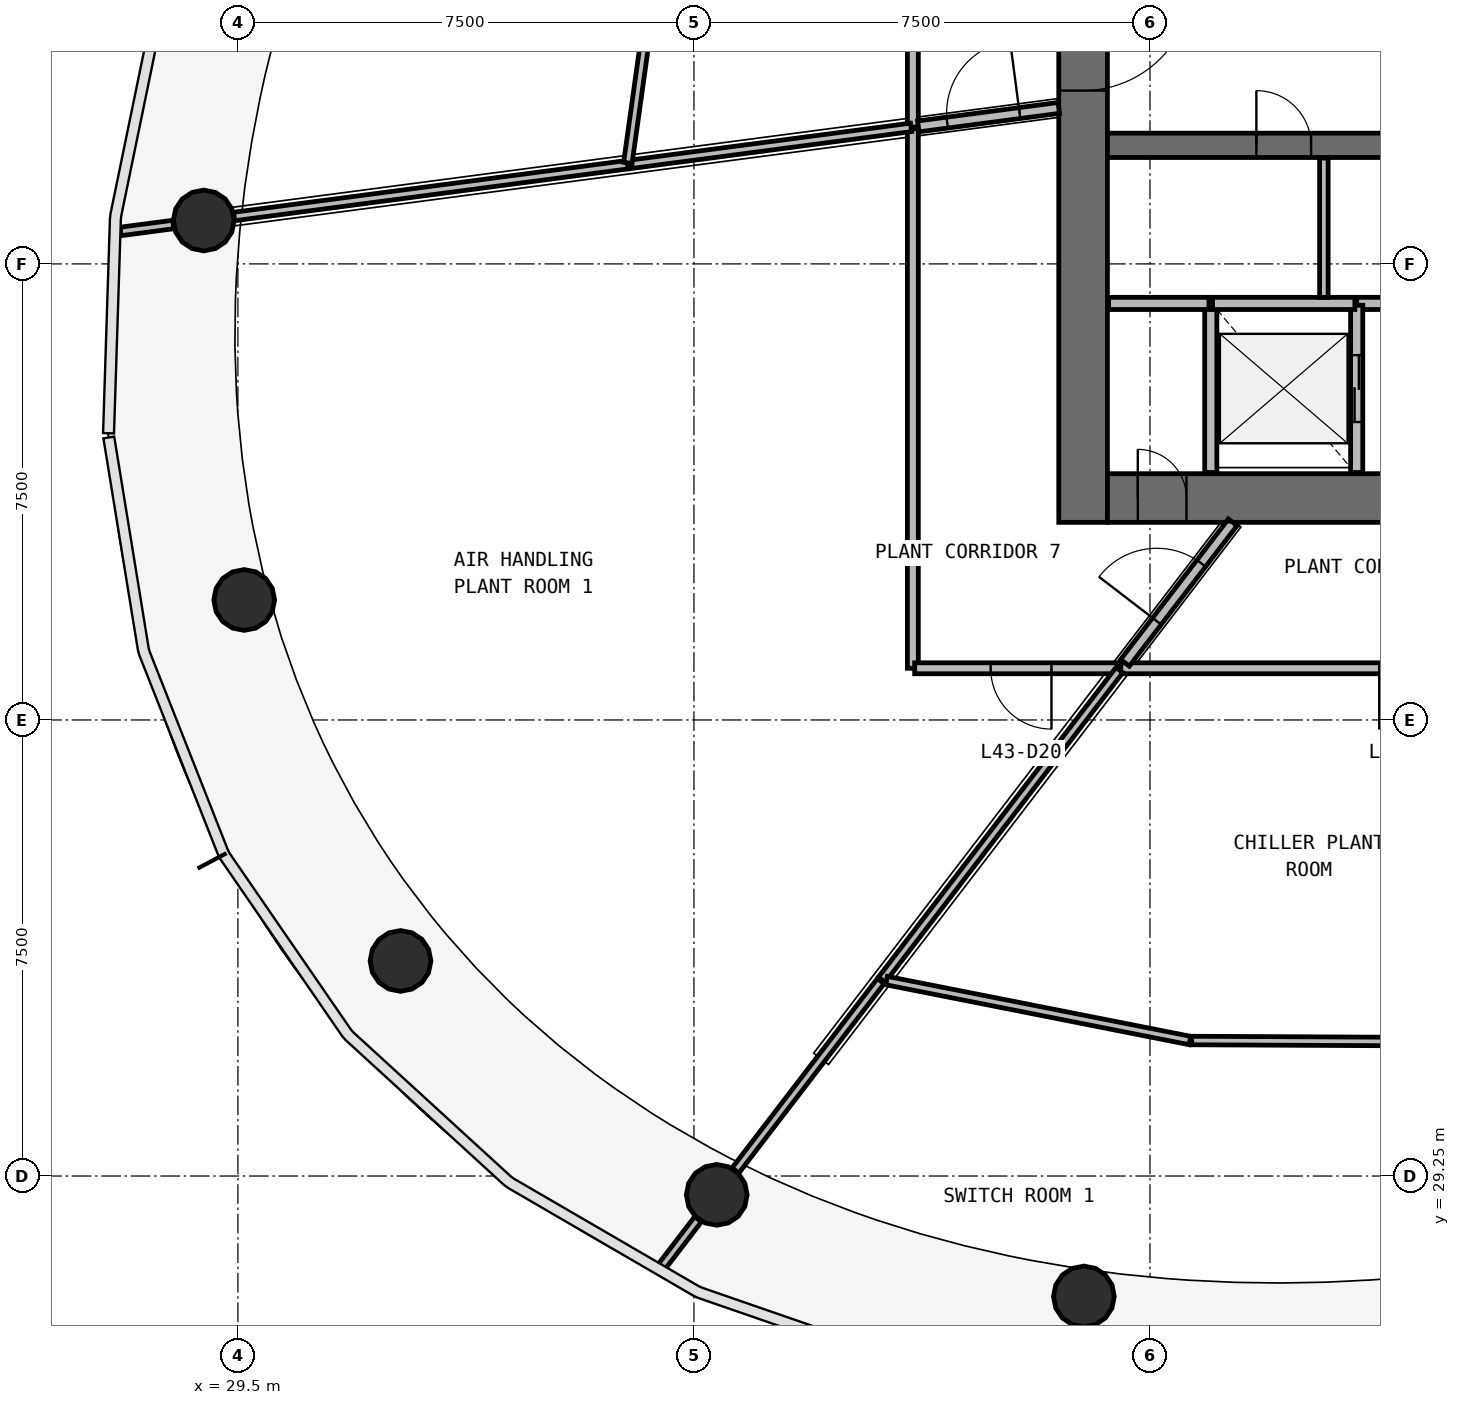
"""IFC4 building model, lengths in metres.
Left out: names, types, materials, properties, quantities, classifications, styles, units other than length and angle.
Written with IfcOpenShell. Run it as: python <this file> out.ifc"""

import sys

from ifc_helpers import new_model, si_unit, direction, frame, frame_2d, origin, origin_2d, place, context, subcontext, project, spatial, rectangle, circle, extrude, source, transform, mapped, element, fill, save


model = new_model("IFC4")
c1 = context("Model", 3, precision=1e-05, world=origin(), true_north=direction((0.0, 1.0)))
c2 = subcontext(c1, "Body", "Model", "MODEL_VIEW")
j1 = project(units=[si_unit("LENGTHUNIT", "METRE"), si_unit("PLANEANGLEUNIT", "RADIAN")], contexts=[c1])
p1 = place(None, origin())
s1 = spatial("IfcSite", under=j1, at=p1, CompositionType="ELEMENT")
p2 = place(p1, origin())
s2 = spatial("IfcBuilding", under=s1, at=p2, CompositionType="ELEMENT")
p3 = place(p2, frame((0.0, 0.0, 179.9)))
s3 = spatial("IfcBuildingStorey", under=s2, at=p3, CompositionType="ELEMENT", Elevation=179.9)
p4 = place(p3, frame((43.4, 56.0, 0.0), z_axis=(0.0, 0.0, 1.0), x_axis=(0.0, -1.0, 0.0)))
e1 = element("IfcWall", 1, at=p4, inside=s3, PredefinedType="SHEAR", context=c2, shape_type="SweptSolid", body=[
    extrude(rectangle(XDim=16.0, YDim=0.8, at=frame_2d((8.0, 0.0))), origin(), (0.0, 0.0, 1.0), 3.9),
])
p5 = place(p4, frame((7.1, 0.0, 0.0)))
e2 = element("IfcOpeningElement", 2, at=p5, cuts=e1, PredefinedType="OPENING", context=c2, shape_type="SweptSolid", body=[
    extrude(rectangle(XDim=1.8, YDim=2.1, at=frame_2d((0.9, 1.05))), frame((0.0, 0.41, 0.0), z_axis=(0.0, -1.0, 0.0), x_axis=(1.0, 0.0, 0.0)), (0.0, 0.0, 1.0), 0.82),
])
p6 = place(p3, frame((43.8, 40.4, 0.0), z_axis=(0.0, 0.0, 1.0), x_axis=(1.0, 0.0, 0.0)))
e3 = element("IfcWall", 3, at=p6, inside=s3, PredefinedType="SHEAR", context=c2, shape_type="SweptSolid", body=[
    extrude(rectangle(XDim=16.4, YDim=0.8, at=frame_2d((8.2, 0.0))), origin(), (0.0, 0.0, 1.0), 3.9),
])
p7 = place(p6, frame((10.1, 0.0, 0.0)))
e4 = element("IfcOpeningElement", 4, at=p7, cuts=e3, PredefinedType="OPENING", context=c2, shape_type="SweptSolid", body=[
    extrude(rectangle(XDim=1.2, YDim=2.1, at=frame_2d((0.6, 1.05))), frame((0.0, 0.41, 0.0), z_axis=(0.0, -1.0, 0.0), x_axis=(1.0, 0.0, 0.0)), (0.0, 0.0, 1.0), 0.82),
])
p8 = place(p6, frame((7.05, 0.0, 0.0)))
e5 = element("IfcOpeningElement", 5, at=p8, cuts=e3, PredefinedType="OPENING", context=c2, shape_type="SweptSolid", body=[
    extrude(rectangle(XDim=1.1, YDim=2.1, at=frame_2d((0.55, 1.05))), frame((0.0, 0.41, 0.0), z_axis=(0.0, -1.0, 0.0), x_axis=(1.0, 0.0, 0.0)), (0.0, 0.0, 1.0), 0.82),
])
p9 = place(p6, frame((0.5, 0.0, 0.0)))
e6 = element("IfcOpeningElement", 6, at=p9, cuts=e3, PredefinedType="OPENING", context=c2, shape_type="SweptSolid", body=[
    extrude(rectangle(XDim=0.8, YDim=2.1, at=frame_2d((0.4, 1.05))), frame((0.0, 0.41, 0.0), z_axis=(0.0, -1.0, 0.0), x_axis=(1.0, 0.0, 0.0)), (0.0, 0.0, 1.0), 0.82),
])
p10 = place(p3, frame((43.8, 46.2, 0.0), z_axis=(0.0, 0.0, 1.0), x_axis=(1.0, 0.0, 0.0)))
e7 = element("IfcWall", 7, at=p10, inside=s3, PredefinedType="SHEAR", context=c2, shape_type="SweptSolid", body=[
    extrude(rectangle(XDim=16.4, YDim=0.4, at=frame_2d((8.2, 0.0))), origin(), (0.0, 0.0, 1.0), 3.9),
])
p11 = place(p10, frame((2.45, 0.0, 0.0)))
e8 = element("IfcOpeningElement", 8, at=p11, cuts=e7, PredefinedType="OPENING", context=c2, shape_type="SweptSolid", body=[
    extrude(rectangle(XDim=0.9, YDim=2.1, at=frame_2d((0.45, 1.05))), frame((0.0, 0.21, 0.0), z_axis=(0.0, -1.0, 0.0), x_axis=(1.0, 0.0, 0.0)), (0.0, 0.0, 1.0), 0.42),
])
p12 = place(p10, frame((7.65, 0.0, 0.0)))
e9 = element("IfcOpeningElement", 9, at=p12, cuts=e7, PredefinedType="OPENING", context=c2, shape_type="SweptSolid", body=[
    extrude(rectangle(XDim=0.9, YDim=2.1, at=frame_2d((0.45, 1.05))), frame((0.0, 0.21, 0.0), z_axis=(0.0, -1.0, 0.0), x_axis=(1.0, 0.0, 0.0)), (0.0, 0.0, 1.0), 0.42),
])
m1 = source(origin(), c2, "Body", "SweptSolid", [
    extrude(circle(Radius=0.5, at=origin_2d()), origin(), (0.0, 0.0, 1.0), 3.58),
])
for number, where, z_axis, x_axis in (
    (10, (28.938, 44.964, 0.0), (0.0, 0.0, 1.0), (1.0, 0.0, 0.0)),
    (11, (29.603, 38.723, 0.0), (0.0, 0.0, 1.0), (1.0, 0.0, 0.0)),
    (12, (32.174, 32.787, 0.0), (0.0, 0.0, 1.0), (1.0, 0.0, 0.0)),
    (13, (37.375, 28.94, 0.0), (0.0, 0.0, 1.0), (1.0, 0.0, 0.0)),
    (14, (43.413, 27.269, 0.0), (0.0, 0.0, 1.0), (1.0, 0.0, 0.0)),
):
    element("IfcColumn", number, at=place(p3, frame(where, z_axis=z_axis, x_axis=x_axis)), inside=s3, PredefinedType="COLUMN", context=c2, shape_type="MappedRepresentation", body=[
        mapped(m1, transform((0.0, 0.0, 0.0), scale=1.0)),
    ])
p13 = place(p3, frame((52.7, 43.6, 0.0), z_axis=(0.0, 0.0, 1.0), x_axis=(-1.0, 0.0, 0.0)))
e15 = element("IfcWall", 15, at=p13, inside=s3, PredefinedType="SOLIDWALL", context=c2, shape_type="SweptSolid", body=[
    extrude(rectangle(XDim=4.8, YDim=0.2, at=frame_2d((2.4, 0.0))), origin(), (0.0, 0.0, 1.0), 3.58),
])
p14 = place(p3, frame((45.5, 43.6, 0.0), z_axis=(0.0, 0.0, 1.0), x_axis=(0.0, -1.0, 0.0)))
e16 = element("IfcWall", 16, at=p14, inside=s3, PredefinedType="SOLIDWALL", context=c2, shape_type="SweptSolid", body=[
    extrude(rectangle(XDim=2.78, YDim=0.2, at=frame_2d((1.39, 0.0))), origin(), (0.0, 0.0, 1.0), 3.58),
])
p15 = place(p3, frame((47.9, 40.82, 0.0), z_axis=(0.0, 0.0, 1.0), x_axis=(0.0, 1.0, 0.0)))
e17 = element("IfcWall", 17, at=p15, inside=s3, PredefinedType="SOLIDWALL", context=c2, shape_type="SweptSolid", body=[
    extrude(rectangle(XDim=2.75, YDim=0.2, at=frame_2d((1.375, 0.0))), origin(), (0.0, 0.0, 1.0), 3.58),
])
p16 = place(p15, frame((0.83, 0.0, 0.0)))
e18 = element("IfcOpeningElement", 18, at=p16, cuts=e17, PredefinedType="OPENING", context=c2, shape_type="SweptSolid", body=[
    extrude(rectangle(XDim=1.1, YDim=2.1, at=frame_2d((0.55, 1.05))), frame((0.0, 0.11, 0.0), z_axis=(0.0, -1.0, 0.0), x_axis=(1.0, 0.0, 0.0)), (0.0, 0.0, 1.0), 0.22),
])
p17 = place(p3, frame((47.87, 43.6, 0.0), z_axis=(0.0, 0.0, 1.0), x_axis=(-1.0, 0.0, 0.0)))
e19 = element("IfcWall", 19, at=p17, inside=s3, PredefinedType="SOLIDWALL", context=c2, shape_type="SweptSolid", body=[
    extrude(rectangle(XDim=2.34, YDim=0.2, at=frame_2d((1.17, 0.0))), origin(), (0.0, 0.0, 1.0), 3.58),
])
p18 = place(p3, frame((45.47, 43.6, 0.0), z_axis=(0.0, 0.0, 1.0), x_axis=(-1.0, 0.0, 0.0)))
e20 = element("IfcWall", 20, at=p18, inside=s3, PredefinedType="SOLIDWALL", context=c2, shape_type="SweptSolid", body=[
    extrude(rectangle(XDim=1.65, YDim=0.2, at=frame_2d((0.825, 0.0))), origin(), (0.0, 0.0, 1.0), 3.58),
])
p19 = place(p3, frame((40.6, 46.499, 0.0), z_axis=(0.0, 0.0, 1.0), x_axis=(0.0, 1.0, 0.0)))
e21 = element("IfcWall", 21, at=p19, inside=s3, PredefinedType="PARTITIONING", context=c2, shape_type="SweptSolid", body=[
    extrude(rectangle(XDim=10.248, YDim=0.18, at=frame_2d((5.124, 0.0))), origin(), (0.0, 0.0, 1.0), 2.38),
])
p20 = place(p19, frame((4.598, 0.0, 0.0)))
e22 = element("IfcOpeningElement", 22, at=p20, cuts=e21, PredefinedType="OPENING", context=c2, shape_type="SweptSolid", body=[
    extrude(rectangle(XDim=1.0, YDim=2.1, at=frame_2d((0.5, 1.05))), frame((0.0, 0.1, 0.0), z_axis=(0.0, -1.0, 0.0), x_axis=(1.0, 0.0, 0.0)), (0.0, 0.0, 1.0), 0.2),
])
p21 = place(p3, frame((53.339, 37.6, 0.0), z_axis=(0.0, 0.0, 1.0), x_axis=(-1.0, 0.0, 0.0)))
e23 = element("IfcWall", 23, at=p21, inside=s3, PredefinedType="PARTITIONING", context=c2, shape_type="SweptSolid", body=[
    extrude(rectangle(XDim=9.319, YDim=0.18, at=frame_2d((4.66, 0.0))), origin(), (0.0, 0.0, 1.0), 2.38),
])
p22 = place(p21, frame((4.069, 0.0, 0.0)))
e24 = element("IfcOpeningElement", 24, at=p22, cuts=e23, PredefinedType="OPENING", context=c2, shape_type="SweptSolid", body=[
    extrude(rectangle(XDim=1.0, YDim=2.1, at=frame_2d((0.5, 1.05))), frame((0.0, 0.1, 0.0), z_axis=(0.0, -1.0, 0.0), x_axis=(1.0, 0.0, 0.0)), (0.0, 0.0, 1.0), 0.2),
])
p23 = place(p3, frame((40.6, 46.469, 0.0), z_axis=(0.0, 0.0, 1.0), x_axis=(0.0, -1.0, 0.0)))
e25 = element("IfcWall", 25, at=p23, inside=s3, PredefinedType="PARTITIONING", context=c2, shape_type="SweptSolid", body=[
    extrude(rectangle(XDim=8.869, YDim=0.18, at=frame_2d((4.435, 0.0))), origin(), (0.0, 0.0, 1.0), 2.38),
])
p24 = place(p3, frame((43.99, 37.6, 0.0), z_axis=(0.0, 0.0, 1.0), x_axis=(-1.0, 0.0, 0.0)))
e26 = element("IfcWall", 26, at=p24, inside=s3, PredefinedType="PARTITIONING", context=c2, shape_type="SweptSolid", body=[
    extrude(rectangle(XDim=3.36, YDim=0.18, at=frame_2d((1.68, 0.0))), origin(), (0.0, 0.0, 1.0), 2.38),
])
p25 = place(p24, frame((1.11, 0.0, 0.0)))
e27 = element("IfcOpeningElement", 27, at=p25, cuts=e26, PredefinedType="OPENING", context=c2, shape_type="SweptSolid", body=[
    extrude(rectangle(XDim=1.0, YDim=2.1, at=frame_2d((0.5, 1.05))), frame((0.0, 0.1, 0.0), z_axis=(0.0, -1.0, 0.0), x_axis=(1.0, 0.0, 0.0)), (0.0, 0.0, 1.0), 0.2),
])
p26 = place(p3, frame((44.089, 37.69, 0.0), z_axis=(0.0, 0.0, 1.0), x_axis=(0.608737787706, 0.793371480341, 0.0)))
e28 = element("IfcWall", 28, at=p26, inside=s3, PredefinedType="PARTITIONING", context=c2, shape_type="SweptSolid", body=[
    extrude(rectangle(XDim=2.912, YDim=0.18, at=frame_2d((1.456, 0.0))), origin(), (0.0, 0.0, 1.0), 2.38),
])
p27 = place(p26, frame((0.862, 0.0, 0.0)))
e29 = element("IfcOpeningElement", 29, at=p27, cuts=e28, PredefinedType="OPENING", context=c2, shape_type="SweptSolid", body=[
    extrude(rectangle(XDim=1.2, YDim=2.1, at=frame_2d((0.6, 1.05))), frame((0.0, 0.1, 0.0), z_axis=(0.0, -1.0, 0.0), x_axis=(1.0, 0.0, 0.0)), (0.0, 0.0, 1.0), 0.2),
])
p28 = place(p3, frame((40.69, 46.511, 0.0), z_axis=(0.0, 0.0, 1.0), x_axis=(0.991440737811, 0.130557509967, 0.0)))
e30 = element("IfcWall", 30, at=p28, inside=s3, PredefinedType="PARTITIONING", context=c2, shape_type="SweptSolid", body=[
    extrude(rectangle(XDim=2.33, YDim=0.18, at=frame_2d((1.165, 0.0))), origin(), (0.0, 0.0, 1.0), 2.38),
])
p29 = place(p28, frame((0.48, 0.0, 0.0)))
e31 = element("IfcOpeningElement", 31, at=p29, cuts=e30, PredefinedType="OPENING", context=c2, shape_type="SweptSolid", body=[
    extrude(rectangle(XDim=1.2, YDim=2.1, at=frame_2d((0.6, 1.05))), frame((0.0, 0.1, 0.0), z_axis=(0.0, -1.0, 0.0), x_axis=(1.0, 0.0, 0.0)), (0.0, 0.0, 1.0), 0.2),
])
p30 = place(p3, frame((35.909, 45.882, 0.0), z_axis=(0.0, 0.0, 1.0), x_axis=(-0.991447036881, -0.130509666541, 0.0)))
e32 = element("IfcWall", 32, at=p30, inside=s3, PredefinedType="PARTITIONING", context=c2, shape_type="SweptSolid", body=[
    extrude(rectangle(XDim=6.527, YDim=0.14, at=frame_2d((3.263, 0.0))), origin(), (0.0, 0.0, 1.0), 2.38),
])
p31 = place(p3, frame((43.998, 37.571, 0.0), z_axis=(0.0, 0.0, 1.0), x_axis=(-0.608770902547, -0.7933460709, 0.0)))
e33 = element("IfcWall", 33, at=p31, inside=s3, PredefinedType="PARTITIONING", context=c2, shape_type="SweptSolid", body=[
    extrude(rectangle(XDim=6.418, YDim=0.14, at=frame_2d((3.209, 0.0))), origin(), (0.0, 0.0, 1.0), 2.38),
])
p32 = place(p3, frame((40.167, 32.464, 0.0), z_axis=(0.0, 0.0, 1.0), x_axis=(0.981032247985, -0.193844598618, 0.0)))
e34 = element("IfcWall", 34, at=p32, inside=s3, PredefinedType="PARTITIONING", context=c2, shape_type="SweptSolid", body=[
    extrude(rectangle(XDim=5.086, YDim=0.14, at=frame_2d((2.543, 0.0))), origin(), (0.0, 0.0, 1.0), 2.38),
])
p33 = place(p3, frame((40.57, 46.495, 0.0), z_axis=(0.0, 0.0, 1.0), x_axis=(-0.991448780362, -0.130496421093, 0.0)))
e35 = element("IfcWall", 35, at=p33, inside=s3, PredefinedType="PARTITIONING", context=c2, shape_type="SweptSolid", body=[
    extrude(rectangle(XDim=4.672, YDim=0.14, at=frame_2d((2.336, 0.0))), origin(), (0.0, 0.0, 1.0), 2.38),
])
p34 = place(p3, frame((45.187, 31.479, 0.0), z_axis=(0.0, 0.0, 1.0), x_axis=(0.999988261157, -0.004845363671, 0.0)))
e36 = element("IfcWall", 36, at=p34, inside=s3, PredefinedType="PARTITIONING", context=c2, shape_type="SweptSolid", body=[
    extrude(rectangle(XDim=4.635, YDim=0.14, at=frame_2d((2.318, 0.0))), origin(), (0.0, 0.0, 1.0), 2.38),
])
p35 = place(p3, frame((36.491, 50.042, 0.0), z_axis=(0.0, 0.0, 1.0), x_axis=(-0.138560575964, -0.990353960354, 0.0)))
e37 = element("IfcWall", 37, at=p35, inside=s3, PredefinedType="PARTITIONING", context=c2, shape_type="SweptSolid", body=[
    extrude(rectangle(XDim=4.171, YDim=0.14, at=frame_2d((2.085, 0.0))), origin(), (0.0, 0.0, 1.0), 2.38),
])
p36 = place(p3, frame((40.073, 32.456, 0.0), z_axis=(0.0, 0.0, 1.0), x_axis=(-0.608817875064, -0.793310024519, 0.0)))
e38 = element("IfcWall", 38, at=p36, inside=s3, PredefinedType="PARTITIONING", context=c2, shape_type="SweptSolid", body=[
    extrude(rectangle(XDim=3.926, YDim=0.14, at=frame_2d((1.963, 0.0))), origin(), (0.0, 0.0, 1.0), 2.38),
])
p37 = place(p3, frame((47.36, 43.7, 0.0), z_axis=(0.0, 0.0, 1.0), x_axis=(0.0, 1.0, 0.0)))
e39 = element("IfcWall", 39, at=p37, inside=s3, PredefinedType="PARTITIONING", context=c2, shape_type="SweptSolid", body=[
    extrude(rectangle(XDim=2.29, YDim=0.14, at=frame_2d((1.145, 0.0))), origin(), (0.0, 0.0, 1.0), 2.88),
])
p38 = place(p3, frame((37.068, 28.54, 0.0), z_axis=(0.0, 0.0, 1.0), x_axis=(-0.608854774338, -0.793281705175, 0.0)))
e40 = element("IfcWall", 40, at=p38, inside=s3, PredefinedType="PARTITIONING", context=c2, shape_type="SweptSolid", body=[
    extrude(rectangle(XDim=0.993, YDim=0.14, at=frame_2d((0.497, 0.0))), origin(), (0.0, 0.0, 1.0), 2.88),
])
p39 = place(p3, frame((28.438, 44.898, 0.0), z_axis=(0.0, 0.0, 1.0), x_axis=(-0.991459985339, -0.130411262827, 0.0)))
e41 = element("IfcWall", 41, at=p39, inside=s3, PredefinedType="PARTITIONING", context=c2, shape_type="SweptSolid", body=[
    extrude(rectangle(XDim=0.876, YDim=0.14, at=frame_2d((0.438, 0.0))), origin(), (0.0, 0.0, 1.0), 2.88),
])
m2 = source(origin(), c2, "Body", "SweptSolid", [
    extrude(rectangle(XDim=1.8, YDim=2.1, at=frame_2d((0.9, 1.05))), frame((0.0, 0.025, 0.0), z_axis=(0.0, -1.0, 0.0), x_axis=(1.0, 0.0, 0.0)), (0.0, 0.0, 1.0), 0.05),
])
p40 = place(p5, origin())
e42 = element("IfcDoor", 42, at=p40, inside=s3, OperationType="SINGLE_SWING_LEFT", PredefinedType="DOOR", context=c2, shape_type="MappedRepresentation", body=[
    mapped(m2, transform((0.0, 0.0, 0.0), scale=1.0)),
])
fill(e2, e42)
m3 = source(origin(), c2, "Body", "SweptSolid", [
    extrude(rectangle(XDim=1.1, YDim=2.1, at=frame_2d((0.55, 1.05))), frame((0.0, 0.025, 0.0), z_axis=(0.0, -1.0, 0.0), x_axis=(1.0, 0.0, 0.0)), (0.0, 0.0, 1.0), 0.05),
])
p41 = place(p16, origin())
e43 = element("IfcDoor", 43, at=p41, inside=s3, OperationType="DOUBLE_DOOR_SLIDING", PredefinedType="USERDEFINED", context=c2, shape_type="MappedRepresentation", body=[
    mapped(m3, transform((0.0, 0.0, 0.0), scale=1.0)),
])
fill(e18, e43)
m4 = source(origin(), c2, "Body", "SweptSolid", [
    extrude(rectangle(XDim=0.8, YDim=2.1, at=frame_2d((0.4, 1.05))), frame((0.0, 0.025, 0.0), z_axis=(0.0, -1.0, 0.0), x_axis=(1.0, 0.0, 0.0)), (0.0, 0.0, 1.0), 0.05),
])
p42 = place(p9, origin())
e44 = element("IfcDoor", 44, at=p42, inside=s3, OperationType="SINGLE_SWING_LEFT", PredefinedType="DOOR", context=c2, shape_type="MappedRepresentation", body=[
    mapped(m4, transform((0.0, 0.0, 0.0), scale=1.0)),
])
fill(e6, e44)
m5 = source(origin(), c2, "Body", "SweptSolid", [
    extrude(rectangle(XDim=1.0, YDim=2.1, at=frame_2d((0.5, 1.05))), frame((0.0, 0.025, 0.0), z_axis=(0.0, -1.0, 0.0), x_axis=(1.0, 0.0, 0.0)), (0.0, 0.0, 1.0), 0.05),
])
p43 = place(p25, origin())
e45 = element("IfcDoor", 45, at=p43, inside=s3, OperationType="SINGLE_SWING_LEFT", PredefinedType="DOOR", context=c2, shape_type="MappedRepresentation", body=[
    mapped(m5, transform((0.0, 0.0, 0.0), scale=1.0)),
])
fill(e27, e45)
p44 = place(p22, origin())
e46 = element("IfcDoor", 46, at=p44, inside=s3, OperationType="SINGLE_SWING_RIGHT", PredefinedType="DOOR", context=c2, shape_type="MappedRepresentation", body=[
    mapped(m5, transform((0.0, 0.0, 0.0), scale=1.0)),
])
fill(e24, e46)
m6 = source(origin(), c2, "Body", "SweptSolid", [
    extrude(rectangle(XDim=1.2, YDim=2.1, at=frame_2d((0.6, 1.05))), frame((0.0, 0.025, 0.0), z_axis=(0.0, -1.0, 0.0), x_axis=(1.0, 0.0, 0.0)), (0.0, 0.0, 1.0), 0.05),
])
p45 = place(p29, origin())
e47 = element("IfcDoor", 47, at=p45, inside=s3, OperationType="SINGLE_SWING_RIGHT", PredefinedType="DOOR", context=c2, shape_type="MappedRepresentation", body=[
    mapped(m6, transform((0.0, 0.0, 0.0), scale=1.0)),
])
fill(e31, e47)
p46 = place(p27, origin())
e48 = element("IfcDoor", 48, at=p46, inside=s3, OperationType="SINGLE_SWING_LEFT", PredefinedType="DOOR", context=c2, shape_type="MappedRepresentation", body=[
    mapped(m6, transform((0.0, 0.0, 0.0), scale=1.0)),
])
fill(e29, e48)
m7 = source(origin(), c2, "Body", "SweptSolid", [
    extrude(rectangle(XDim=0.9, YDim=2.1, at=frame_2d((0.45, 1.05))), frame((0.0, 0.025, 0.0), z_axis=(0.0, -1.0, 0.0), x_axis=(1.0, 0.0, 0.0)), (0.0, 0.0, 1.0), 0.05),
])
p47 = place(p11, origin())
e49 = element("IfcDoor", 49, at=p47, inside=s3, OperationType="SINGLE_SWING_LEFT", PredefinedType="DOOR", context=c2, shape_type="MappedRepresentation", body=[
    mapped(m7, transform((0.0, 0.0, 0.0), scale=1.0)),
])
fill(e8, e49)
save(model, sys.argv[1])
